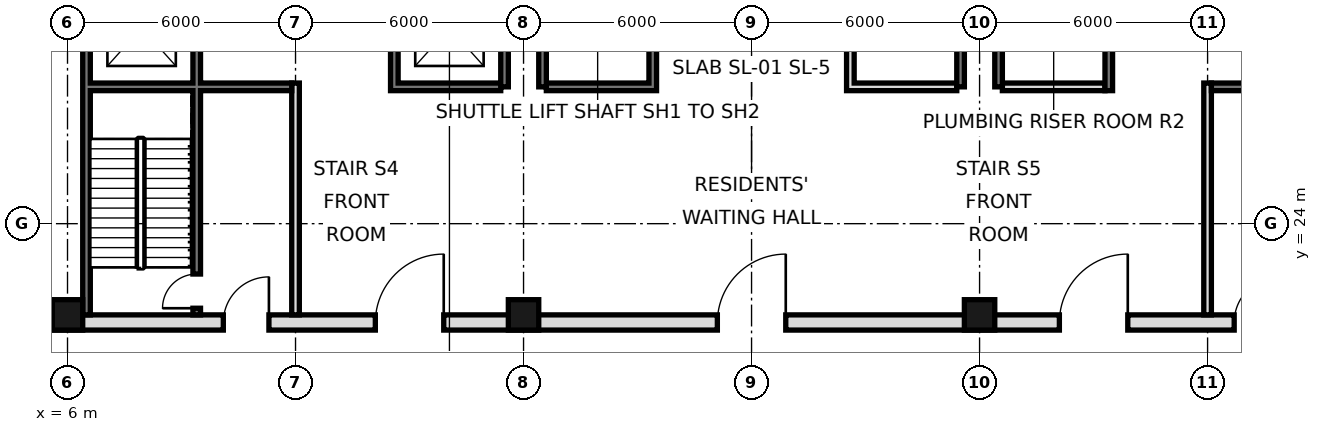
"""IFC4 building model, lengths in metres.
Left out: names, types, materials, properties, quantities, classifications, styles, units other than length and angle.
Written with IfcOpenShell. Run it as: python <this file> out.ifc"""

import sys

from ifc_helpers import new_model, si_unit, direction, frame, frame_2d, origin, origin_2d, place, context, subcontext, project, spatial, rectangle, hollow_rectangle, extrude, element, fill, save


model = new_model("IFC4")
c1 = context("Model", 3, precision=1e-05, world=origin(), true_north=direction((0.0, 1.0)))
c2 = subcontext(c1, "Body", "Model", "MODEL_VIEW")
j1 = project(units=[si_unit("LENGTHUNIT", "METRE"), si_unit("PLANEANGLEUNIT", "RADIAN")], contexts=[c1])
p1 = place(None, origin())
s1 = spatial("IfcSite", under=j1, at=p1, CompositionType="ELEMENT")
p2 = place(p1, origin())
s2 = spatial("IfcBuilding", under=s1, at=p2, CompositionType="ELEMENT")
p3 = place(p2, frame((0.0, 0.0, 39.6)))
s3 = spatial("IfcBuildingStorey", under=s2, at=p3, CompositionType="ELEMENT", Elevation=39.6)
for number, where, z_axis, x_axis in (
    (1, (6.0, 21.6, 0.0), (0.0, 0.0, 1.0), (1.0, 0.0, 0.0)),
    (2, (18.0, 21.6, 0.0), (0.0, 0.0, 1.0), (1.0, 0.0, 0.0)),
    (3, (30.0, 21.6, 0.0), (0.0, 0.0, 1.0), (1.0, 0.0, 0.0)),
):
    element("IfcColumn", number, at=place(p3, frame(where, z_axis=z_axis, x_axis=x_axis)), inside=s3, PredefinedType="COLUMN", context=c2, shape_type="SweptSolid", body=[
        extrude(hollow_rectangle(XDim=0.8, YDim=0.8, WallThickness=0.07, at=origin_2d()), origin(), (0.0, 0.0, 1.0), 4.8),
    ])
p4 = place(p3, frame((6.5, 21.6, 0.0), z_axis=(0.0, 0.0, 1.0), x_axis=(0.0, 1.0, 0.0)))
e4 = element("IfcWall", 4, at=p4, inside=s3, PredefinedType="SOLIDWALL", context=c2, shape_type="SweptSolid", body=[
    extrude(rectangle(XDim=23.5, YDim=0.2, at=frame_2d((11.75, 0.0))), origin(), (0.0, 0.0, 1.0), 4.5),
])
for number, where, z_axis, x_axis in (
    (5, (17.5, 27.6, 0.0), (0.0, 0.0, 1.0), (0.0, 1.0, 0.0)),
    (6, (18.5, 27.6, 0.0), (0.0, 0.0, 1.0), (0.0, 1.0, 0.0)),
    (7, (29.5, 27.6, 0.0), (0.0, 0.0, 1.0), (0.0, 1.0, 0.0)),
    (8, (30.5, 27.6, 0.0), (0.0, 0.0, 1.0), (0.0, 1.0, 0.0)),
):
    element("IfcWall", number, at=place(p3, frame(where, z_axis=z_axis, x_axis=x_axis)), inside=s3, PredefinedType="SOLIDWALL", context=c2, shape_type="SweptSolid", body=[
        extrude(rectangle(XDim=17.5, YDim=0.2, at=frame_2d((8.75, 0.0))), origin(), (0.0, 0.0, 1.0), 4.5),
    ])
p5 = place(p3, frame((5.6, 21.4, 0.0), z_axis=(0.0, 0.0, 1.0), x_axis=(1.0, 0.0, 0.0)))
e9 = element("IfcWall", 9, at=p5, inside=s3, PredefinedType="SOLIDWALL", context=c2, shape_type="SweptSolid", body=[
    extrude(rectangle(XDim=36.8, YDim=0.4, at=frame_2d((18.4, 0.0))), origin(), (0.0, 0.0, 1.0), 4.5),
])
p6 = place(p5, frame((8.5, 0.0, 0.0)))
e10 = element("IfcOpeningElement", 10, at=p6, cuts=e9, PredefinedType="OPENING", context=c2, shape_type="SweptSolid", body=[
    extrude(rectangle(XDim=1.8, YDim=2.1, at=frame_2d((0.9, 1.05))), frame((0.0, 0.21, 0.0), z_axis=(0.0, -1.0, 0.0), x_axis=(1.0, 0.0, 0.0)), (0.0, 0.0, 1.0), 0.42),
])
p7 = place(p5, frame((17.5, 0.0, 0.0)))
e11 = element("IfcOpeningElement", 11, at=p7, cuts=e9, PredefinedType="OPENING", context=c2, shape_type="SweptSolid", body=[
    extrude(rectangle(XDim=1.8, YDim=2.1, at=frame_2d((0.9, 1.05))), frame((0.0, 0.21, 0.0), z_axis=(0.0, -1.0, 0.0), x_axis=(1.0, 0.0, 0.0)), (0.0, 0.0, 1.0), 0.42),
])
p8 = place(p5, frame((26.5, 0.0, 0.0)))
e12 = element("IfcOpeningElement", 12, at=p8, cuts=e9, PredefinedType="OPENING", context=c2, shape_type="SweptSolid", body=[
    extrude(rectangle(XDim=1.8, YDim=2.1, at=frame_2d((0.9, 1.05))), frame((0.0, 0.21, 0.0), z_axis=(0.0, -1.0, 0.0), x_axis=(1.0, 0.0, 0.0)), (0.0, 0.0, 1.0), 0.42),
])
p9 = place(p5, frame((4.5, 0.0, 0.0)))
e13 = element("IfcOpeningElement", 13, at=p9, cuts=e9, PredefinedType="OPENING", context=c2, shape_type="SweptSolid", body=[
    extrude(rectangle(XDim=1.2, YDim=2.1, at=frame_2d((0.6, 1.05))), frame((0.0, 0.21, 0.0), z_axis=(0.0, -1.0, 0.0), x_axis=(1.0, 0.0, 0.0)), (0.0, 0.0, 1.0), 0.42),
])
p10 = place(p5, frame((31.1, 0.0, 0.0)))
e14 = element("IfcOpeningElement", 14, at=p10, cuts=e9, PredefinedType="OPENING", context=c2, shape_type="SweptSolid", body=[
    extrude(rectangle(XDim=1.2, YDim=2.1, at=frame_2d((0.6, 1.05))), frame((0.0, 0.21, 0.0), z_axis=(0.0, -1.0, 0.0), x_axis=(1.0, 0.0, 0.0)), (0.0, 0.0, 1.0), 0.42),
])
p11 = place(p3, frame((12.0, 21.6, 0.0), z_axis=(0.0, 0.0, 1.0), x_axis=(0.0, 1.0, 0.0)))
e15 = element("IfcWall", 15, at=p11, inside=s3, PredefinedType="PARTITIONING", context=c2, shape_type="SweptSolid", body=[
    extrude(rectangle(XDim=6.1, YDim=0.2, at=frame_2d((3.05, 0.0))), origin(), (0.0, 0.0, 1.0), 4.5),
])
p12 = place(p3, frame((14.6, 27.5, 0.0), z_axis=(0.0, 0.0, 1.0), x_axis=(0.0, 1.0, 0.0)))
e16 = element("IfcWall", 16, at=p12, inside=s3, PredefinedType="SOLIDWALL", context=c2, shape_type="SweptSolid", body=[
    extrude(rectangle(XDim=17.5, YDim=0.2, at=frame_2d((8.75, 0.0))), origin(), (0.0, 0.0, 1.0), 4.5),
])
p13 = place(p12, frame((1.1, 0.0, 0.0)))
e17 = element("IfcOpeningElement", 17, at=p13, cuts=e16, PredefinedType="OPENING", context=c2, shape_type="SweptSolid", body=[
    extrude(rectangle(XDim=1.1, YDim=2.1, at=frame_2d((0.55, 1.05))), frame((0.0, 0.11, 0.0), z_axis=(0.0, -1.0, 0.0), x_axis=(1.0, 0.0, 0.0)), (0.0, 0.0, 1.0), 0.22),
])
p14 = place(p12, frame((4.2, 0.0, 0.0)))
e18 = element("IfcOpeningElement", 18, at=p14, cuts=e16, PredefinedType="OPENING", context=c2, shape_type="SweptSolid", body=[
    extrude(rectangle(XDim=1.1, YDim=2.1, at=frame_2d((0.55, 1.05))), frame((0.0, 0.11, 0.0), z_axis=(0.0, -1.0, 0.0), x_axis=(1.0, 0.0, 0.0)), (0.0, 0.0, 1.0), 0.22),
])
p15 = place(p12, frame((15.4, 0.0, 0.0)))
e19 = element("IfcOpeningElement", 19, at=p15, cuts=e16, PredefinedType="OPENING", context=c2, shape_type="SweptSolid", body=[
    extrude(rectangle(XDim=1.1, YDim=2.1, at=frame_2d((0.55, 1.05))), frame((0.0, 0.11, 0.0), z_axis=(0.0, -1.0, 0.0), x_axis=(1.0, 0.0, 0.0)), (0.0, 0.0, 1.0), 0.22),
])
p16 = place(p12, frame((9.9, 0.0, 0.0)))
e20 = element("IfcOpeningElement", 20, at=p16, cuts=e16, PredefinedType="OPENING", context=c2, shape_type="SweptSolid", body=[
    extrude(rectangle(XDim=0.9, YDim=2.1, at=frame_2d((0.45, 1.05))), frame((0.0, 0.11, 0.0), z_axis=(0.0, -1.0, 0.0), x_axis=(1.0, 0.0, 0.0)), (0.0, 0.0, 1.0), 0.22),
])
p17 = place(p3, frame((21.4, 27.5, 0.0), z_axis=(0.0, 0.0, 1.0), x_axis=(0.0, 1.0, 0.0)))
e21 = element("IfcWall", 21, at=p17, inside=s3, PredefinedType="SOLIDWALL", context=c2, shape_type="SweptSolid", body=[
    extrude(rectangle(XDim=17.5, YDim=0.2, at=frame_2d((8.75, 0.0))), origin(), (0.0, 0.0, 1.0), 4.5),
])
p18 = place(p17, frame((16.2, 0.0, 0.0)))
e22 = element("IfcOpeningElement", 22, at=p18, cuts=e21, PredefinedType="OPENING", context=c2, shape_type="SweptSolid", body=[
    extrude(rectangle(XDim=1.0, YDim=2.1, at=frame_2d((0.5, 1.05))), frame((0.0, 0.11, 0.0), z_axis=(0.0, -1.0, 0.0), x_axis=(1.0, 0.0, 0.0)), (0.0, 0.0, 1.0), 0.22),
])
p19 = place(p17, frame((7.4, 0.0, 0.0)))
e23 = element("IfcOpeningElement", 23, at=p19, cuts=e21, PredefinedType="OPENING", context=c2, shape_type="SweptSolid", body=[
    extrude(rectangle(XDim=0.9, YDim=2.1, at=frame_2d((0.45, 1.05))), frame((0.0, 0.11, 0.0), z_axis=(0.0, -1.0, 0.0), x_axis=(1.0, 0.0, 0.0)), (0.0, 0.0, 1.0), 0.22),
])
p20 = place(p3, frame((26.6, 27.5, 0.0), z_axis=(0.0, 0.0, 1.0), x_axis=(0.0, 1.0, 0.0)))
e24 = element("IfcWall", 24, at=p20, inside=s3, PredefinedType="SOLIDWALL", context=c2, shape_type="SweptSolid", body=[
    extrude(rectangle(XDim=17.5, YDim=0.2, at=frame_2d((8.75, 0.0))), origin(), (0.0, 0.0, 1.0), 4.5),
])
p21 = place(p20, frame((4.3, 0.0, 0.0)))
e25 = element("IfcOpeningElement", 25, at=p21, cuts=e24, PredefinedType="OPENING", context=c2, shape_type="SweptSolid", body=[
    extrude(rectangle(XDim=0.9, YDim=2.1, at=frame_2d((0.45, 1.05))), frame((0.0, 0.11, 0.0), z_axis=(0.0, -1.0, 0.0), x_axis=(1.0, 0.0, 0.0)), (0.0, 0.0, 1.0), 0.22),
])
p22 = place(p20, frame((10.35, 0.0, 0.0)))
e26 = element("IfcOpeningElement", 26, at=p22, cuts=e24, PredefinedType="OPENING", context=c2, shape_type="SweptSolid", body=[
    extrude(rectangle(XDim=1.0, YDim=2.1, at=frame_2d((0.5, 1.05))), frame((0.0, 0.11, 0.0), z_axis=(0.0, -1.0, 0.0), x_axis=(1.0, 0.0, 0.0)), (0.0, 0.0, 1.0), 0.22),
])
p23 = place(p20, frame((14.575, 0.0, 0.0)))
e27 = element("IfcOpeningElement", 27, at=p23, cuts=e24, PredefinedType="OPENING", context=c2, shape_type="SweptSolid", body=[
    extrude(rectangle(XDim=1.0, YDim=2.1, at=frame_2d((0.5, 1.05))), frame((0.0, 0.11, 0.0), z_axis=(0.0, -1.0, 0.0), x_axis=(1.0, 0.0, 0.0)), (0.0, 0.0, 1.0), 0.22),
])
p24 = place(p3, frame((33.4, 27.5, 0.0), z_axis=(0.0, 0.0, 1.0), x_axis=(0.0, 1.0, 0.0)))
e28 = element("IfcWall", 28, at=p24, inside=s3, PredefinedType="SOLIDWALL", context=c2, shape_type="SweptSolid", body=[
    extrude(rectangle(XDim=17.5, YDim=0.2, at=frame_2d((8.75, 0.0))), origin(), (0.0, 0.0, 1.0), 4.5),
])
p25 = place(p24, frame((15.4, 0.0, 0.0)))
e29 = element("IfcOpeningElement", 29, at=p25, cuts=e28, PredefinedType="OPENING", context=c2, shape_type="SweptSolid", body=[
    extrude(rectangle(XDim=1.1, YDim=2.1, at=frame_2d((0.55, 1.05))), frame((0.0, 0.11, 0.0), z_axis=(0.0, -1.0, 0.0), x_axis=(1.0, 0.0, 0.0)), (0.0, 0.0, 1.0), 0.22),
])
p26 = place(p24, frame((2.7, 0.0, 0.0)))
e30 = element("IfcOpeningElement", 30, at=p26, cuts=e28, PredefinedType="OPENING", context=c2, shape_type="SweptSolid", body=[
    extrude(rectangle(XDim=1.0, YDim=2.1, at=frame_2d((0.5, 1.05))), frame((0.0, 0.11, 0.0), z_axis=(0.0, -1.0, 0.0), x_axis=(1.0, 0.0, 0.0)), (0.0, 0.0, 1.0), 0.22),
])
p27 = place(p24, frame((9.9, 0.0, 0.0)))
e31 = element("IfcOpeningElement", 31, at=p27, cuts=e28, PredefinedType="OPENING", context=c2, shape_type="SweptSolid", body=[
    extrude(rectangle(XDim=0.9, YDim=2.1, at=frame_2d((0.45, 1.05))), frame((0.0, 0.11, 0.0), z_axis=(0.0, -1.0, 0.0), x_axis=(1.0, 0.0, 0.0)), (0.0, 0.0, 1.0), 0.22),
])
p28 = place(p3, frame((36.0, 21.6, 0.0), z_axis=(0.0, 0.0, 1.0), x_axis=(0.0, 1.0, 0.0)))
e32 = element("IfcWall", 32, at=p28, inside=s3, PredefinedType="PARTITIONING", context=c2, shape_type="SweptSolid", body=[
    extrude(rectangle(XDim=6.1, YDim=0.2, at=frame_2d((3.05, 0.0))), origin(), (0.0, 0.0, 1.0), 4.5),
])
p29 = place(p3, frame((9.4, 21.6, 0.0), z_axis=(0.0, 0.0, 1.0), x_axis=(0.0, 1.0, 0.0)))
e33 = element("IfcWall", 33, at=p29, inside=s3, PredefinedType="SOLIDWALL", context=c2, shape_type="SweptSolid", body=[
    extrude(rectangle(XDim=23.4, YDim=0.2, at=frame_2d((11.7, 0.0))), origin(), (0.0, 0.0, 1.0), 4.5),
])
p30 = place(p29, frame((7.0, 0.0, 0.0)))
e34 = element("IfcOpeningElement", 34, at=p30, cuts=e33, PredefinedType="OPENING", context=c2, shape_type="SweptSolid", body=[
    extrude(rectangle(XDim=1.1, YDim=2.1, at=frame_2d((0.55, 1.05))), frame((0.0, 0.11, 0.0), z_axis=(0.0, -1.0, 0.0), x_axis=(1.0, 0.0, 0.0)), (0.0, 0.0, 1.0), 0.22),
])
p31 = place(p29, frame((10.1, 0.0, 0.0)))
e35 = element("IfcOpeningElement", 35, at=p31, cuts=e33, PredefinedType="OPENING", context=c2, shape_type="SweptSolid", body=[
    extrude(rectangle(XDim=1.1, YDim=2.1, at=frame_2d((0.55, 1.05))), frame((0.0, 0.11, 0.0), z_axis=(0.0, -1.0, 0.0), x_axis=(1.0, 0.0, 0.0)), (0.0, 0.0, 1.0), 0.22),
])
p32 = place(p29, frame((13.2, 0.0, 0.0)))
e36 = element("IfcOpeningElement", 36, at=p32, cuts=e33, PredefinedType="OPENING", context=c2, shape_type="SweptSolid", body=[
    extrude(rectangle(XDim=1.1, YDim=2.1, at=frame_2d((0.55, 1.05))), frame((0.0, 0.11, 0.0), z_axis=(0.0, -1.0, 0.0), x_axis=(1.0, 0.0, 0.0)), (0.0, 0.0, 1.0), 0.22),
])
p33 = place(p29, frame((22.1, 0.0, 0.0)))
e37 = element("IfcOpeningElement", 37, at=p33, cuts=e33, PredefinedType="OPENING", context=c2, shape_type="SweptSolid", body=[
    extrude(rectangle(XDim=1.0, YDim=2.1, at=frame_2d((0.5, 1.05))), frame((0.0, 0.11, 0.0), z_axis=(0.0, -1.0, 0.0), x_axis=(1.0, 0.0, 0.0)), (0.0, 0.0, 1.0), 0.22),
])
p34 = place(p29, frame((0.175, 0.0, 0.0)))
e38 = element("IfcOpeningElement", 38, at=p34, cuts=e33, PredefinedType="OPENING", context=c2, shape_type="SweptSolid", body=[
    extrude(rectangle(XDim=0.9, YDim=2.1, at=frame_2d((0.45, 1.05))), frame((0.0, 0.11, 0.0), z_axis=(0.0, -1.0, 0.0), x_axis=(1.0, 0.0, 0.0)), (0.0, 0.0, 1.0), 0.22),
])
for number, where, z_axis, x_axis in (
    (39, (14.7, 27.6, 0.0), (0.0, 0.0, 1.0), (1.0, 0.0, 0.0)),
    (40, (18.6, 27.6, 0.0), (0.0, 0.0, 1.0), (1.0, 0.0, 0.0)),
    (41, (26.7, 27.6, 0.0), (0.0, 0.0, 1.0), (1.0, 0.0, 0.0)),
):
    element("IfcWall", number, at=place(p3, frame(where, z_axis=z_axis, x_axis=x_axis)), inside=s3, PredefinedType="SOLIDWALL", context=c2, shape_type="SweptSolid", body=[
        extrude(rectangle(XDim=2.7, YDim=0.2, at=frame_2d((1.35, 0.0))), origin(), (0.0, 0.0, 1.0), 4.5),
    ])
p35 = place(p3, frame((30.6, 27.6, 0.0), z_axis=(0.0, 0.0, 1.0), x_axis=(1.0, 0.0, 0.0)))
e42 = element("IfcWall", 42, at=p35, inside=s3, PredefinedType="PARTITIONING", context=c2, shape_type="SweptSolid", body=[
    extrude(rectangle(XDim=2.7, YDim=0.2, at=frame_2d((1.35, 0.0))), origin(), (0.0, 0.0, 1.0), 4.5),
])
for number, where, z_axis, x_axis in (
    (43, (36.1, 27.6, 0.0), (0.0, 0.0, 1.0), (1.0, 0.0, 0.0)),
    (44, (6.6, 27.6, 0.0), (0.0, 0.0, 1.0), (1.0, 0.0, 0.0)),
):
    element("IfcWall", number, at=place(p3, frame(where, z_axis=z_axis, x_axis=x_axis)), inside=s3, PredefinedType="SOLIDWALL", context=c2, shape_type="SweptSolid", body=[
        extrude(rectangle(XDim=5.3, YDim=0.2, at=frame_2d((2.65, 0.0))), origin(), (0.0, 0.0, 1.0), 4.5),
    ])
p36 = place(p6, frame((1.8, 0.0, 0.0), z_axis=(0.0, 0.0, 1.0), x_axis=(-1.0, 0.0, 0.0)))
e45 = element("IfcDoor", 45, at=p36, inside=s3, OperationType="SINGLE_SWING_LEFT", PredefinedType="DOOR", context=c2, shape_type="SweptSolid", body=[
    extrude(rectangle(XDim=1.8, YDim=2.1, at=frame_2d((0.9, 1.05))), frame((0.0, 0.025, 0.0), z_axis=(0.0, -1.0, 0.0), x_axis=(1.0, 0.0, 0.0)), (0.0, 0.0, 1.0), 0.05),
])
fill(e10, e45)
p37 = place(p7, frame((1.8, 0.0, 0.0), z_axis=(0.0, 0.0, 1.0), x_axis=(-1.0, 0.0, 0.0)))
e46 = element("IfcDoor", 46, at=p37, inside=s3, OperationType="SINGLE_SWING_LEFT", PredefinedType="DOOR", context=c2, shape_type="SweptSolid", body=[
    extrude(rectangle(XDim=1.8, YDim=2.1, at=frame_2d((0.9, 1.05))), frame((0.0, 0.025, 0.0), z_axis=(0.0, -1.0, 0.0), x_axis=(1.0, 0.0, 0.0)), (0.0, 0.0, 1.0), 0.05),
])
fill(e11, e46)
p38 = place(p8, frame((1.8, 0.0, 0.0), z_axis=(0.0, 0.0, 1.0), x_axis=(-1.0, 0.0, 0.0)))
e47 = element("IfcDoor", 47, at=p38, inside=s3, OperationType="SINGLE_SWING_LEFT", PredefinedType="DOOR", context=c2, shape_type="SweptSolid", body=[
    extrude(rectangle(XDim=1.8, YDim=2.1, at=frame_2d((0.9, 1.05))), frame((0.0, 0.025, 0.0), z_axis=(0.0, -1.0, 0.0), x_axis=(1.0, 0.0, 0.0)), (0.0, 0.0, 1.0), 0.05),
])
fill(e12, e47)
p39 = place(p9, frame((1.2, 0.0, 0.0), z_axis=(0.0, 0.0, 1.0), x_axis=(-1.0, 0.0, 0.0)))
e48 = element("IfcDoor", 48, at=p39, inside=s3, OperationType="SINGLE_SWING_LEFT", PredefinedType="DOOR", context=c2, shape_type="SweptSolid", body=[
    extrude(rectangle(XDim=1.2, YDim=2.1, at=frame_2d((0.6, 1.05))), frame((0.0, 0.025, 0.0), z_axis=(0.0, -1.0, 0.0), x_axis=(1.0, 0.0, 0.0)), (0.0, 0.0, 1.0), 0.05),
])
fill(e13, e48)
p40 = place(p10, frame((1.2, 0.0, 0.0), z_axis=(0.0, 0.0, 1.0), x_axis=(-1.0, 0.0, 0.0)))
e49 = element("IfcDoor", 49, at=p40, inside=s3, OperationType="SINGLE_SWING_LEFT", PredefinedType="DOOR", context=c2, shape_type="SweptSolid", body=[
    extrude(rectangle(XDim=1.2, YDim=2.1, at=frame_2d((0.6, 1.05))), frame((0.0, 0.025, 0.0), z_axis=(0.0, -1.0, 0.0), x_axis=(1.0, 0.0, 0.0)), (0.0, 0.0, 1.0), 0.05),
])
fill(e14, e49)
p41 = place(p34, origin())
e50 = element("IfcDoor", 50, at=p41, inside=s3, OperationType="SINGLE_SWING_LEFT", PredefinedType="DOOR", context=c2, shape_type="SweptSolid", body=[
    extrude(rectangle(XDim=0.9, YDim=2.1, at=frame_2d((0.45, 1.05))), frame((0.0, 0.025, 0.0), z_axis=(0.0, -1.0, 0.0), x_axis=(1.0, 0.0, 0.0)), (0.0, 0.0, 1.0), 0.05),
])
fill(e38, e50)
save(model, sys.argv[1])
